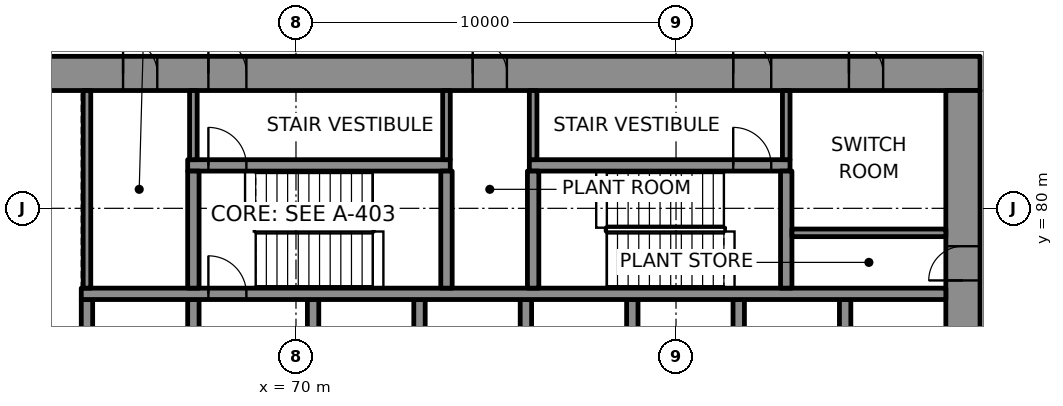
"""IFC4 building model, lengths in metres.
Left out: names, types, materials, properties, quantities, classifications, styles, units other than length and angle.
Written with IfcOpenShell. Run it as: python <this file> out.ifc"""

import sys

from ifc_helpers import new_model, si_unit, direction, frame, frame_2d, origin, place, context, subcontext, project, spatial, rectangle, extrude, element, fill, save


model = new_model("IFC4")
c1 = context("Model", 3, precision=1e-05, world=origin(), true_north=direction((0.0, 1.0)))
c2 = subcontext(c1, "Body", "Model", "MODEL_VIEW")
j1 = project(units=[si_unit("LENGTHUNIT", "METRE"), si_unit("PLANEANGLEUNIT", "RADIAN")], contexts=[c1])
p1 = place(None, origin())
s1 = spatial("IfcSite", under=j1, at=p1, CompositionType="ELEMENT")
p2 = place(p1, origin())
s2 = spatial("IfcBuilding", under=s1, at=p2, CompositionType="ELEMENT")
p3 = place(p2, frame((0.0, 0.0, 40.0)))
s3 = spatial("IfcBuildingStorey", under=s2, at=p3, CompositionType="ELEMENT", Elevation=40.0)
p4 = place(p3, frame((62.0, 83.55, 0.0), z_axis=(0.0, 0.0, 1.0), x_axis=(1.0, 0.0, 0.0)))
e1 = element("IfcWall", 1, at=p4, inside=s3, PredefinedType="SHEAR", context=c2, shape_type="SweptSolid", body=[
    extrude(rectangle(XDim=26.0, YDim=0.9, at=frame_2d((13.0, 0.0))), origin(), (0.0, 0.0, 1.0), 4.0),
])
p5 = place(p4, frame((5.695, 0.0, 0.0)))
e2 = element("IfcOpeningElement", 2, at=p5, cuts=e1, PredefinedType="OPENING", context=c2, shape_type="SweptSolid", body=[
    extrude(rectangle(XDim=1.0, YDim=2.1, at=frame_2d((0.5, 1.05))), frame((0.0, 0.46, 0.0), z_axis=(0.0, -1.0, 0.0), x_axis=(1.0, 0.0, 0.0)), (0.0, 0.0, 1.0), 0.92),
])
p6 = place(p4, frame((19.505, 0.0, 0.0)))
e3 = element("IfcOpeningElement", 3, at=p6, cuts=e1, PredefinedType="OPENING", context=c2, shape_type="SweptSolid", body=[
    extrude(rectangle(XDim=1.0, YDim=2.1, at=frame_2d((0.5, 1.05))), frame((0.0, 0.46, 0.0), z_axis=(0.0, -1.0, 0.0), x_axis=(1.0, 0.0, 0.0)), (0.0, 0.0, 1.0), 0.92),
])
p7 = place(p4, frame((3.45, 0.0, 0.0)))
e4 = element("IfcOpeningElement", 4, at=p7, cuts=e1, PredefinedType="OPENING", context=c2, shape_type="SweptSolid", body=[
    extrude(rectangle(XDim=0.9, YDim=2.1, at=frame_2d((0.45, 1.05))), frame((0.0, 0.46, 0.0), z_axis=(0.0, -1.0, 0.0), x_axis=(1.0, 0.0, 0.0)), (0.0, 0.0, 1.0), 0.92),
])
p8 = place(p4, frame((12.65, 0.0, 0.0)))
e5 = element("IfcOpeningElement", 5, at=p8, cuts=e1, PredefinedType="OPENING", context=c2, shape_type="SweptSolid", body=[
    extrude(rectangle(XDim=0.9, YDim=2.1, at=frame_2d((0.45, 1.05))), frame((0.0, 0.46, 0.0), z_axis=(0.0, -1.0, 0.0), x_axis=(1.0, 0.0, 0.0)), (0.0, 0.0, 1.0), 0.92),
])
p9 = place(p4, frame((22.55, 0.0, 0.0)))
e6 = element("IfcOpeningElement", 6, at=p9, cuts=e1, PredefinedType="OPENING", context=c2, shape_type="SweptSolid", body=[
    extrude(rectangle(XDim=0.9, YDim=2.1, at=frame_2d((0.45, 1.05))), frame((0.0, 0.46, 0.0), z_axis=(0.0, -1.0, 0.0), x_axis=(1.0, 0.0, 0.0)), (0.0, 0.0, 1.0), 0.92),
])
p10 = place(p3, frame((87.55, 66.9, 0.0), z_axis=(0.0, 0.0, 1.0), x_axis=(0.0, 1.0, 0.0)))
e7 = element("IfcWall", 7, at=p10, inside=s3, PredefinedType="SHEAR", context=c2, shape_type="SweptSolid", body=[
    extrude(rectangle(XDim=16.2, YDim=0.9, at=frame_2d((8.1, 0.0))), origin(), (0.0, 0.0, 1.0), 4.0),
])
p11 = place(p10, frame((5.5, 0.0, 0.0)))
e8 = element("IfcOpeningElement", 8, at=p11, cuts=e7, PredefinedType="OPENING", context=c2, shape_type="SweptSolid", body=[
    extrude(rectangle(XDim=1.8, YDim=2.1, at=frame_2d((0.9, 1.05))), frame((0.0, 0.46, 0.0), z_axis=(0.0, -1.0, 0.0), x_axis=(1.0, 0.0, 0.0)), (0.0, 0.0, 1.0), 0.92),
])
p12 = place(p10, frame((11.202, 0.0, 0.0)))
e9 = element("IfcOpeningElement", 9, at=p12, cuts=e7, PredefinedType="OPENING", context=c2, shape_type="SweptSolid", body=[
    extrude(rectangle(XDim=0.9, YDim=2.1, at=frame_2d((0.45, 1.05))), frame((0.0, 0.46, 0.0), z_axis=(0.0, -1.0, 0.0), x_axis=(1.0, 0.0, 0.0)), (0.0, 0.0, 1.0), 0.92),
])
for number, where, z_axis, x_axis in (
    (10, (64.5, 75.0, 0.0), (0.0, 0.0, 1.0), (0.0, 1.0, 0.0)),
    (11, (67.3, 75.0, 0.0), (0.0, 0.0, 1.0), (0.0, 1.0, 0.0)),
):
    element("IfcWall", number, at=place(p3, frame(where, z_axis=z_axis, x_axis=x_axis)), inside=s3, PredefinedType="SHEAR", context=c2, shape_type="SweptSolid", body=[
        extrude(rectangle(XDim=2.6, YDim=0.3, at=frame_2d((1.3, 0.0))), origin(), (0.0, 0.0, 1.0), 4.0),
    ])
p13 = place(p3, frame((70.45, 75.0, 0.0), z_axis=(0.0, 0.0, 1.0), x_axis=(0.0, 1.0, 0.0)))
e12 = element("IfcWall", 12, at=p13, inside=s3, PredefinedType="SHEAR", context=c2, shape_type="SweptSolid", body=[
    extrude(rectangle(XDim=2.6, YDim=0.3, at=frame_2d((1.3, 0.0))), origin(), (0.0, 0.0, 1.0), 4.0),
])
p14 = place(p13, frame((0.15, 0.0, 0.0)))
e13 = element("IfcOpeningElement", 13, at=p14, cuts=e12, PredefinedType="OPENING", context=c2, shape_type="SweptSolid", body=[
    extrude(rectangle(XDim=1.1, YDim=2.1, at=frame_2d((0.55, 1.05))), frame((0.0, 0.16, 0.0), z_axis=(0.0, -1.0, 0.0), x_axis=(1.0, 0.0, 0.0)), (0.0, 0.0, 1.0), 0.32),
])
for number, where, z_axis, x_axis in (
    (14, (73.25, 75.0, 0.0), (0.0, 0.0, 1.0), (0.0, 1.0, 0.0)),
    (15, (76.05, 75.0, 0.0), (0.0, 0.0, 1.0), (0.0, 1.0, 0.0)),
    (16, (78.85, 75.0, 0.0), (0.0, 0.0, 1.0), (0.0, 1.0, 0.0)),
    (17, (81.65, 75.0, 0.0), (0.0, 0.0, 1.0), (0.0, 1.0, 0.0)),
    (18, (84.45, 75.0, 0.0), (0.0, 0.0, 1.0), (0.0, 1.0, 0.0)),
):
    element("IfcWall", number, at=place(p3, frame(where, z_axis=z_axis, x_axis=x_axis)), inside=s3, PredefinedType="SHEAR", context=c2, shape_type="SweptSolid", body=[
        extrude(rectangle(XDim=2.6, YDim=0.3, at=frame_2d((1.3, 0.0))), origin(), (0.0, 0.0, 1.0), 4.0),
    ])
p15 = place(p3, frame((64.35, 77.75, 0.0), z_axis=(0.0, 0.0, 1.0), x_axis=(1.0, 0.0, 0.0)))
e19 = element("IfcWall", 19, at=p15, inside=s3, PredefinedType="SHEAR", context=c2, shape_type="SweptSolid", body=[
    extrude(rectangle(XDim=22.75, YDim=0.3, at=frame_2d((11.375, 0.0))), origin(), (0.0, 0.0, 1.0), 4.0),
])
p16 = place(p15, frame((3.345, 0.0, 0.0)))
e20 = element("IfcOpeningElement", 20, at=p16, cuts=e19, PredefinedType="OPENING", context=c2, shape_type="SweptSolid", body=[
    extrude(rectangle(XDim=1.0, YDim=2.1, at=frame_2d((0.5, 1.05))), frame((0.0, 0.16, 0.0), z_axis=(0.0, -1.0, 0.0), x_axis=(1.0, 0.0, 0.0)), (0.0, 0.0, 1.0), 0.32),
])
p17 = place(p3, frame((67.15, 81.13, 0.0), z_axis=(0.0, 0.0, 1.0), x_axis=(1.0, 0.0, 0.0)))
e21 = element("IfcWall", 21, at=p17, inside=s3, PredefinedType="SHEAR", context=c2, shape_type="SweptSolid", body=[
    extrude(rectangle(XDim=6.91, YDim=0.3, at=frame_2d((3.455, 0.0))), origin(), (0.0, 0.0, 1.0), 4.0),
])
p18 = place(p17, frame((0.545, 0.0, 0.0)))
e22 = element("IfcOpeningElement", 22, at=p18, cuts=e21, PredefinedType="OPENING", context=c2, shape_type="SweptSolid", body=[
    extrude(rectangle(XDim=1.0, YDim=2.1, at=frame_2d((0.5, 1.05))), frame((0.0, 0.16, 0.0), z_axis=(0.0, -1.0, 0.0), x_axis=(1.0, 0.0, 0.0)), (0.0, 0.0, 1.0), 0.32),
])
p19 = place(p3, frame((76.14, 81.13, 0.0), z_axis=(0.0, 0.0, 1.0), x_axis=(1.0, 0.0, 0.0)))
e23 = element("IfcWall", 23, at=p19, inside=s3, PredefinedType="SHEAR", context=c2, shape_type="SweptSolid", body=[
    extrude(rectangle(XDim=6.86, YDim=0.3, at=frame_2d((3.43, 0.0))), origin(), (0.0, 0.0, 1.0), 4.0),
])
p20 = place(p19, frame((5.365, 0.0, 0.0)))
e24 = element("IfcOpeningElement", 24, at=p20, cuts=e23, PredefinedType="OPENING", context=c2, shape_type="SweptSolid", body=[
    extrude(rectangle(XDim=1.0, YDim=2.1, at=frame_2d((0.5, 1.05))), frame((0.0, 0.16, 0.0), z_axis=(0.0, -1.0, 0.0), x_axis=(1.0, 0.0, 0.0)), (0.0, 0.0, 1.0), 0.32),
])
for number, where, z_axis, x_axis in (
    (25, (67.3, 77.9, 0.0), (0.0, 0.0, 1.0), (0.0, 1.0, 0.0)),
    (26, (73.96, 77.9, 0.0), (0.0, 0.0, 1.0), (0.0, 1.0, 0.0)),
    (27, (76.24, 77.9, 0.0), (0.0, 0.0, 1.0), (0.0, 1.0, 0.0)),
    (28, (82.9, 77.9, 0.0), (0.0, 0.0, 1.0), (0.0, 1.0, 0.0)),
):
    element("IfcWall", number, at=place(p3, frame(where, z_axis=z_axis, x_axis=x_axis)), inside=s3, PredefinedType="SHEAR", context=c2, shape_type="SweptSolid", body=[
        extrude(rectangle(XDim=3.08, YDim=0.3, at=frame_2d((1.54, 0.0))), origin(), (0.0, 0.0, 1.0), 4.0),
    ])
p21 = place(p3, frame((83.05, 79.355, 0.0), z_axis=(0.0, 0.0, 1.0), x_axis=(1.0, 0.0, 0.0)))
e29 = element("IfcWall", 29, at=p21, inside=s3, PredefinedType="PARTITIONING", context=c2, shape_type="SweptSolid", body=[
    extrude(rectangle(XDim=4.05, YDim=0.2, at=frame_2d((2.025, 0.0))), origin(), (0.0, 0.0, 1.0), 4.0),
])
p22 = place(p3, frame((64.5, 77.9, 0.0), z_axis=(0.0, 0.0, 1.0), x_axis=(0.0, 1.0, 0.0)))
e30 = element("IfcWall", 30, at=p22, inside=s3, PredefinedType="PARTITIONING", context=c2, shape_type="SweptSolid", body=[
    extrude(rectangle(XDim=5.2, YDim=0.2, at=frame_2d((2.6, 0.0))), origin(), (0.0, 0.0, 1.0), 4.0),
])
for number, where, z_axis, x_axis in (
    (31, (67.3, 81.28, 0.0), (0.0, 0.0, 1.0), (0.0, 1.0, 0.0)),
    (32, (73.96, 81.28, 0.0), (0.0, 0.0, 1.0), (0.0, 1.0, 0.0)),
    (33, (76.24, 81.28, 0.0), (0.0, 0.0, 1.0), (0.0, 1.0, 0.0)),
    (34, (82.9, 81.28, 0.0), (0.0, 0.0, 1.0), (0.0, 1.0, 0.0)),
):
    element("IfcWall", number, at=place(p3, frame(where, z_axis=z_axis, x_axis=x_axis)), inside=s3, PredefinedType="PARTITIONING", context=c2, shape_type="SweptSolid", body=[
        extrude(rectangle(XDim=1.82, YDim=0.2, at=frame_2d((0.91, 0.0))), origin(), (0.0, 0.0, 1.0), 4.0),
    ])
p23 = place(p16, origin())
e35 = element("IfcDoor", 35, at=p23, inside=s3, OperationType="SINGLE_SWING_LEFT", PredefinedType="DOOR", context=c2, shape_type="SweptSolid", body=[
    extrude(rectangle(XDim=1.0, YDim=2.1, at=frame_2d((0.5, 1.05))), frame((0.0, 0.025, 0.0), z_axis=(0.0, -1.0, 0.0), x_axis=(1.0, 0.0, 0.0)), (0.0, 0.0, 1.0), 0.05),
])
fill(e20, e35)
p24 = place(p18, origin())
e36 = element("IfcDoor", 36, at=p24, inside=s3, OperationType="SINGLE_SWING_RIGHT", PredefinedType="DOOR", context=c2, shape_type="SweptSolid", body=[
    extrude(rectangle(XDim=1.0, YDim=2.1, at=frame_2d((0.5, 1.05))), frame((0.0, 0.025, 0.0), z_axis=(0.0, -1.0, 0.0), x_axis=(1.0, 0.0, 0.0)), (0.0, 0.0, 1.0), 0.05),
])
fill(e22, e36)
p25 = place(p5, origin())
e37 = element("IfcDoor", 37, at=p25, inside=s3, OperationType="SINGLE_SWING_LEFT", PredefinedType="DOOR", context=c2, shape_type="SweptSolid", body=[
    extrude(rectangle(XDim=1.0, YDim=2.1, at=frame_2d((0.5, 1.05))), frame((0.0, 0.17, 0.0), z_axis=(0.0, -1.0, 0.0), x_axis=(1.0, 0.0, 0.0)), (0.0, 0.0, 1.0), 0.34),
])
fill(e2, e37)
p26 = place(p20, origin())
e38 = element("IfcDoor", 38, at=p26, inside=s3, OperationType="SINGLE_SWING_RIGHT", PredefinedType="DOOR", context=c2, shape_type="SweptSolid", body=[
    extrude(rectangle(XDim=1.0, YDim=2.1, at=frame_2d((0.5, 1.05))), frame((0.0, 0.025, 0.0), z_axis=(0.0, -1.0, 0.0), x_axis=(1.0, 0.0, 0.0)), (0.0, 0.0, 1.0), 0.05),
])
fill(e24, e38)
p27 = place(p6, origin())
e39 = element("IfcDoor", 39, at=p27, inside=s3, OperationType="SINGLE_SWING_LEFT", PredefinedType="DOOR", context=c2, shape_type="SweptSolid", body=[
    extrude(rectangle(XDim=1.0, YDim=2.1, at=frame_2d((0.5, 1.05))), frame((0.0, 0.17, 0.0), z_axis=(0.0, -1.0, 0.0), x_axis=(1.0, 0.0, 0.0)), (0.0, 0.0, 1.0), 0.34),
])
fill(e3, e39)
p28 = place(p7, origin())
e40 = element("IfcDoor", 40, at=p28, inside=s3, OperationType="SINGLE_SWING_RIGHT", PredefinedType="DOOR", context=c2, shape_type="SweptSolid", body=[
    extrude(rectangle(XDim=0.9, YDim=2.1, at=frame_2d((0.45, 1.05))), frame((0.0, 0.17, 0.0), z_axis=(0.0, -1.0, 0.0), x_axis=(1.0, 0.0, 0.0)), (0.0, 0.0, 1.0), 0.34),
])
fill(e4, e40)
p29 = place(p8, origin())
e41 = element("IfcDoor", 41, at=p29, inside=s3, OperationType="SINGLE_SWING_LEFT", PredefinedType="DOOR", context=c2, shape_type="SweptSolid", body=[
    extrude(rectangle(XDim=0.9, YDim=2.1, at=frame_2d((0.45, 1.05))), frame((0.0, 0.17, 0.0), z_axis=(0.0, -1.0, 0.0), x_axis=(1.0, 0.0, 0.0)), (0.0, 0.0, 1.0), 0.34),
])
fill(e5, e41)
p30 = place(p12, origin())
e42 = element("IfcDoor", 42, at=p30, inside=s3, OperationType="SINGLE_SWING_RIGHT", PredefinedType="DOOR", context=c2, shape_type="SweptSolid", body=[
    extrude(rectangle(XDim=0.9, YDim=2.1, at=frame_2d((0.45, 1.05))), frame((0.0, 0.17, 0.0), z_axis=(0.0, -1.0, 0.0), x_axis=(1.0, 0.0, 0.0)), (0.0, 0.0, 1.0), 0.34),
])
fill(e9, e42)
p31 = place(p9, origin())
e43 = element("IfcDoor", 43, at=p31, inside=s3, OperationType="SINGLE_SWING_LEFT", PredefinedType="DOOR", context=c2, shape_type="SweptSolid", body=[
    extrude(rectangle(XDim=0.9, YDim=2.1, at=frame_2d((0.45, 1.05))), frame((0.0, 0.17, 0.0), z_axis=(0.0, -1.0, 0.0), x_axis=(1.0, 0.0, 0.0)), (0.0, 0.0, 1.0), 0.34),
])
fill(e6, e43)
save(model, sys.argv[1])
